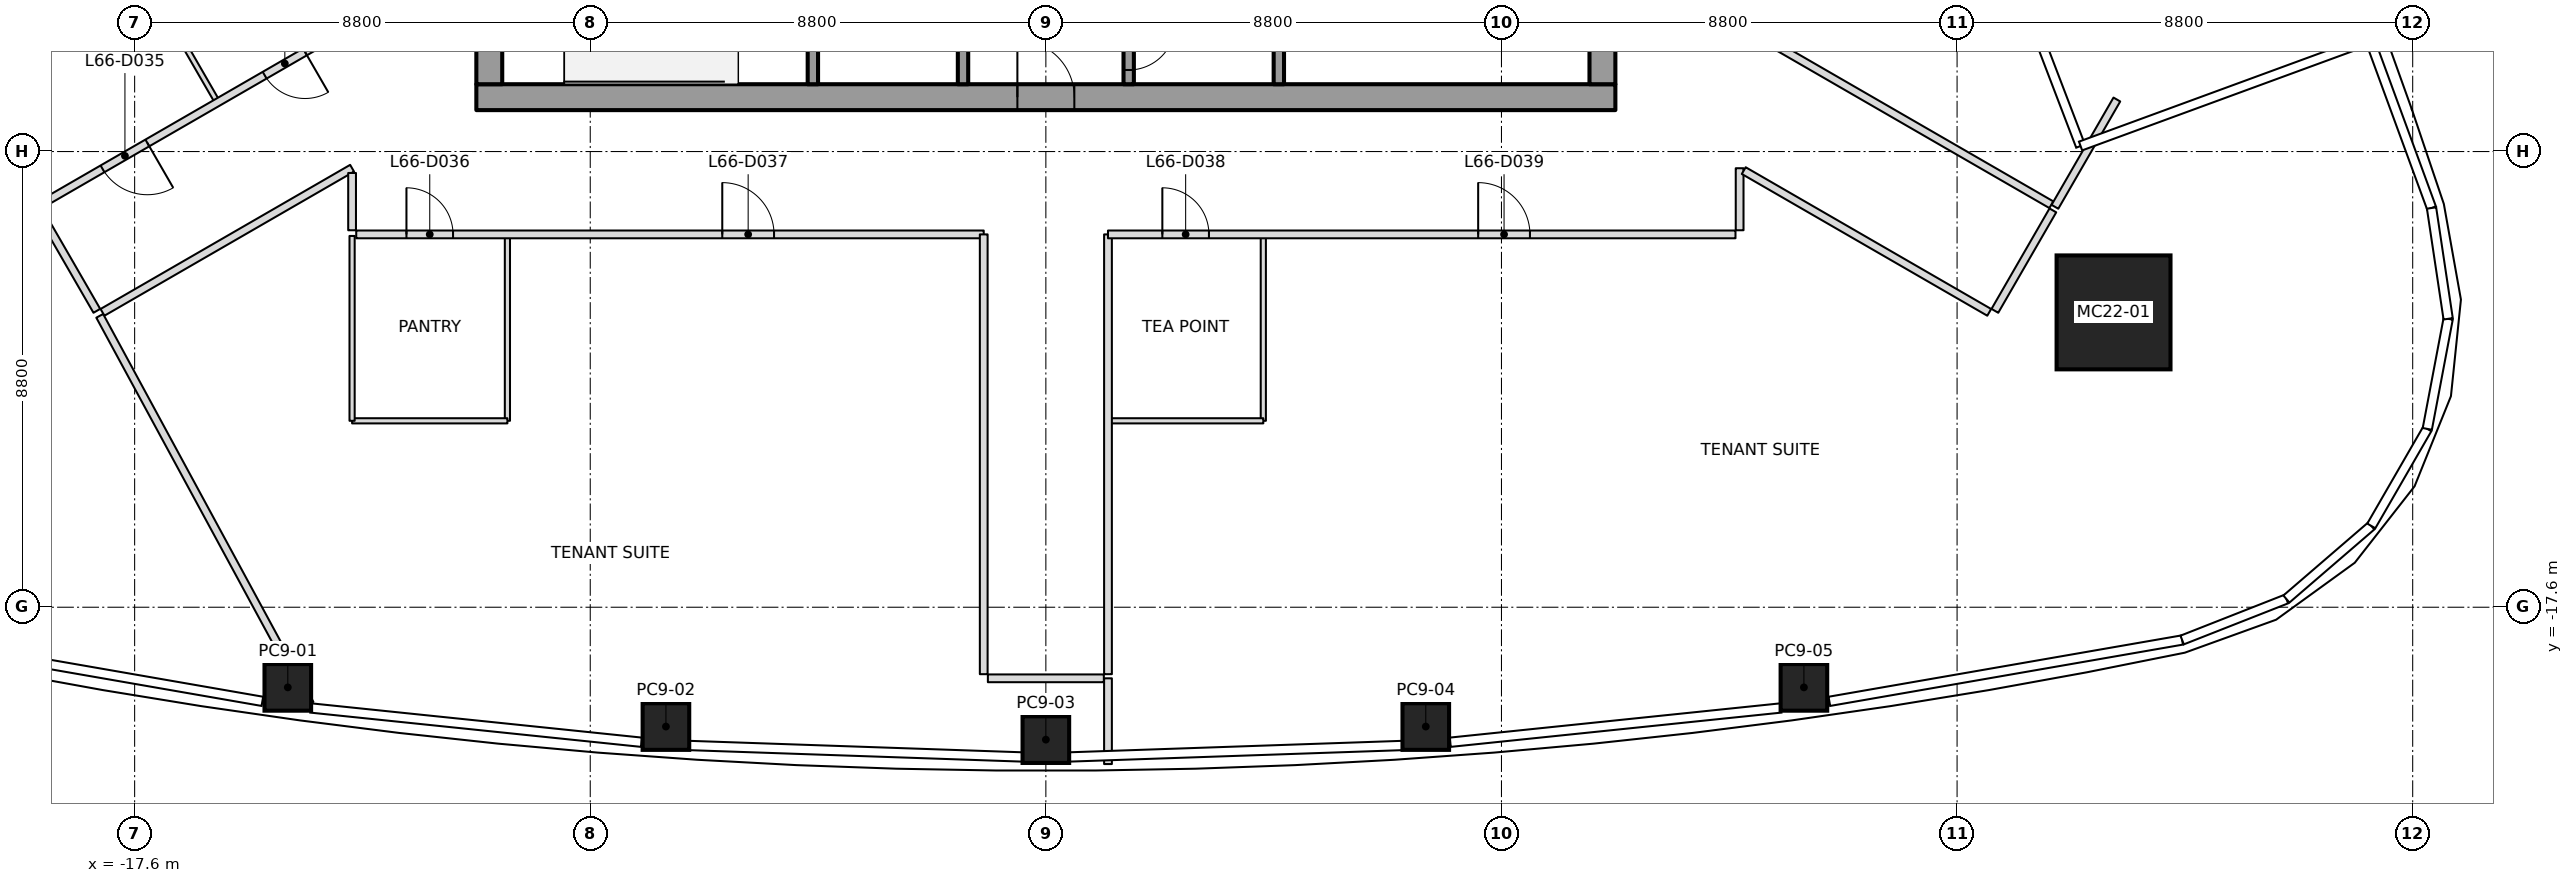
"""IFC4 building model, lengths in metres.
Left out: names, types, materials, properties, quantities, classifications, styles, units other than length and angle.
Written with IfcOpenShell. Run it as: python <this file> out.ifc"""

import sys

from ifc_helpers import new_model, si_unit, direction, frame, frame_2d, origin, origin_2d, place, context, subcontext, project, spatial, rectangle, extrude, element, fill, save


model = new_model("IFC4")
c1 = context("Model", 3, precision=1e-05, world=origin(), true_north=direction((0.0, 1.0)))
c2 = subcontext(c1, "Body", "Model", "MODEL_VIEW")
j1 = project(units=[si_unit("LENGTHUNIT", "METRE"), si_unit("PLANEANGLEUNIT", "RADIAN")], contexts=[c1])
p1 = place(None, origin())
s1 = spatial("IfcSite", under=j1, at=p1, CompositionType="ELEMENT")
p2 = place(p1, origin())
s2 = spatial("IfcBuilding", under=s1, at=p2, CompositionType="ELEMENT")
p3 = place(p2, frame((0.0, 0.0, 291.0)))
s3 = spatial("IfcBuildingStorey", under=s2, at=p3, CompositionType="ELEMENT", Elevation=291.0)
p4 = place(p3, frame((20.622, -11.906, 0.0), z_axis=(-0.027756720281, 0.01604399436, 0.999485945236), x_axis=(0.999614708015, 0.000445500311, 0.027753144871)))
e1 = element("IfcColumn", 1, at=p4, inside=s3, PredefinedType="COLUMN", context=c2, shape_type="SweptSolid", body=[
    extrude(rectangle(XDim=2.2, YDim=2.2, at=origin_2d()), origin(), (0.0, 0.0, 1.0), 4.002),
])
p5 = place(p3, frame((-14.642, -19.148, 0.0), z_axis=(0.017452456582, 0.010373837829, 0.999793876381), x_axis=(-0.99038951846, 0.137393509371, 0.015862701763)))
e2 = element("IfcColumn", 2, at=p5, inside=s3, PredefinedType="COLUMN", context=c2, shape_type="SweptSolid", body=[
    extrude(rectangle(XDim=0.9, YDim=0.9, at=origin_2d()), origin(), (0.0, 0.0, 1.0), 4.001),
])
p6 = place(p3, frame((-7.338, -19.905, 0.0), z_axis=(0.008727150594, 0.011168311599, 0.999899547784), x_axis=(-0.997594360715, 0.068865682036, 0.007937840196)))
e3 = element("IfcColumn", 3, at=p6, inside=s3, PredefinedType="COLUMN", context=c2, shape_type="SweptSolid", body=[
    extrude(rectangle(XDim=0.9, YDim=0.9, at=origin_2d()), origin(), (0.0, 0.0, 1.0), 4.0),
])
p7 = place(p3, frame((0.0, -20.157, 0.0), z_axis=(0.0, 0.01141283087, 0.999934871525), x_axis=(1.0, 0.0, 0.0)))
e4 = element("IfcColumn", 4, at=p7, inside=s3, PredefinedType="COLUMN", context=c2, shape_type="SweptSolid", body=[
    extrude(rectangle(XDim=0.9, YDim=0.9, at=origin_2d()), origin(), (0.0, 0.0, 1.0), 4.0),
])
p8 = place(p3, frame((7.338, -19.905, 0.0), z_axis=(-0.008727150594, 0.011168311599, 0.999899547784), x_axis=(0.997594360715, 0.068865682036, 0.007937840196)))
e5 = element("IfcColumn", 5, at=p8, inside=s3, PredefinedType="COLUMN", context=c2, shape_type="SweptSolid", body=[
    extrude(rectangle(XDim=0.9, YDim=0.9, at=origin_2d()), origin(), (0.0, 0.0, 1.0), 4.0),
])
p9 = place(p3, frame((14.642, -19.148, 0.0), z_axis=(-0.017452456582, 0.010373837829, 0.999793876381), x_axis=(0.99038951846, 0.137393509371, 0.015862701763)))
e6 = element("IfcColumn", 6, at=p9, inside=s3, PredefinedType="COLUMN", context=c2, shape_type="SweptSolid", body=[
    extrude(rectangle(XDim=0.9, YDim=0.9, at=origin_2d()), origin(), (0.0, 0.0, 1.0), 4.001),
])
p10 = place(p3, frame((-11.0, -7.75, 0.0), z_axis=(0.0, 0.0, 1.0), x_axis=(1.0, 0.0, 0.0)))
e7 = element("IfcWall", 7, at=p10, inside=s3, PredefinedType="SHEAR", context=c2, shape_type="SweptSolid", body=[
    extrude(rectangle(XDim=22.0, YDim=0.5, at=frame_2d((11.0, 0.0))), origin(), (0.0, 0.0, 1.0), 4.0),
])
p11 = place(p10, frame((10.45, 0.0, 0.0)))
e8 = element("IfcOpeningElement", 8, at=p11, cuts=e7, PredefinedType="OPENING", context=c2, shape_type="SweptSolid", body=[
    extrude(rectangle(XDim=1.1, YDim=2.1, at=frame_2d((0.55, 1.05))), frame((0.0, 0.25, 0.0), z_axis=(0.0, -1.0, 0.0), x_axis=(1.0, 0.0, 0.0)), (0.0, 0.0, 1.0), 0.5),
])
p12 = place(p3, frame((-10.75, -7.5, 0.0), z_axis=(0.0, 0.0, 1.0), x_axis=(0.0, 1.0, 0.0)))
e9 = element("IfcWall", 9, at=p12, inside=s3, PredefinedType="SHEAR", context=c2, shape_type="SweptSolid", body=[
    extrude(rectangle(XDim=15.0, YDim=0.5, at=frame_2d((7.5, 0.0))), origin(), (0.0, 0.0, 1.0), 4.0),
])
p13 = place(p12, frame((6.6, 0.0, 0.0)))
e10 = element("IfcOpeningElement", 10, at=p13, cuts=e9, PredefinedType="OPENING", context=c2, shape_type="SweptSolid", body=[
    extrude(rectangle(XDim=1.8, YDim=2.1, at=frame_2d((0.9, 1.05))), frame((0.0, 0.25, 0.0), z_axis=(0.0, -1.0, 0.0), x_axis=(1.0, 0.0, 0.0)), (0.0, 0.0, 1.0), 0.5),
])
p14 = place(p3, frame((10.75, -7.5, 0.0), z_axis=(0.0, 0.0, 1.0), x_axis=(0.0, 1.0, 0.0)))
e11 = element("IfcWall", 11, at=p14, inside=s3, PredefinedType="SHEAR", context=c2, shape_type="SweptSolid", body=[
    extrude(rectangle(XDim=15.0, YDim=0.5, at=frame_2d((7.5, 0.0))), origin(), (0.0, 0.0, 1.0), 4.0),
])
p15 = place(p14, frame((6.6, 0.0, 0.0)))
e12 = element("IfcOpeningElement", 12, at=p15, cuts=e11, PredefinedType="OPENING", context=c2, shape_type="SweptSolid", body=[
    extrude(rectangle(XDim=1.8, YDim=2.1, at=frame_2d((0.9, 1.05))), frame((0.0, 0.25, 0.0), z_axis=(0.0, -1.0, 0.0), x_axis=(1.0, 0.0, 0.0)), (0.0, 0.0, 1.0), 0.5),
])
p16 = place(p3, frame((-4.5, -4.6, 0.0), z_axis=(0.0, 0.0, 1.0), x_axis=(0.0, -1.0, 0.0)))
e13 = element("IfcWall", 13, at=p16, inside=s3, PredefinedType="SOLIDWALL", context=c2, shape_type="SweptSolid", body=[
    extrude(rectangle(XDim=2.9, YDim=0.2, at=frame_2d((1.45, 0.0))), origin(), (0.0, 0.0, 1.0), 3.85),
])
p17 = place(p3, frame((-1.6, -7.5, 0.0), z_axis=(0.0, 0.0, 1.0), x_axis=(0.0, 1.0, 0.0)))
e14 = element("IfcWall", 14, at=p17, inside=s3, PredefinedType="SOLIDWALL", context=c2, shape_type="SweptSolid", body=[
    extrude(rectangle(XDim=2.9, YDim=0.2, at=frame_2d((1.45, 0.0))), origin(), (0.0, 0.0, 1.0), 3.85),
])
p18 = place(p17, frame((0.9, 0.0, 0.0)))
e15 = element("IfcOpeningElement", 15, at=p18, cuts=e14, PredefinedType="OPENING", context=c2, shape_type="SweptSolid", body=[
    extrude(rectangle(XDim=1.1, YDim=2.1, at=frame_2d((0.55, 1.05))), frame((0.0, 0.1, 0.0), z_axis=(0.0, -1.0, 0.0), x_axis=(1.0, 0.0, 0.0)), (0.0, 0.0, 1.0), 0.2),
])
p19 = place(p3, frame((1.6, -6.05, 0.0), z_axis=(0.0, 0.0, 1.0), x_axis=(0.0, -1.0, 0.0)))
e16 = element("IfcWall", 16, at=p19, inside=s3, PredefinedType="SOLIDWALL", context=c2, shape_type="SweptSolid", body=[
    extrude(rectangle(XDim=1.45, YDim=0.2, at=frame_2d((0.725, 0.0))), origin(), (0.0, 0.0, 1.0), 3.85),
])
p20 = place(p19, frame((0.275, 0.0, 0.0)))
e17 = element("IfcOpeningElement", 17, at=p20, cuts=e16, PredefinedType="OPENING", context=c2, shape_type="SweptSolid", body=[
    extrude(rectangle(XDim=0.9, YDim=2.1, at=frame_2d((0.45, 1.05))), frame((0.0, 0.1, 0.0), z_axis=(0.0, -1.0, 0.0), x_axis=(1.0, 0.0, 0.0)), (0.0, 0.0, 1.0), 0.2),
])
p21 = place(p3, frame((4.5, -6.05, 0.0), z_axis=(0.0, 0.0, 1.0), x_axis=(0.0, -1.0, 0.0)))
e18 = element("IfcWall", 18, at=p21, inside=s3, PredefinedType="SOLIDWALL", context=c2, shape_type="SweptSolid", body=[
    extrude(rectangle(XDim=1.45, YDim=0.2, at=frame_2d((0.725, 0.0))), origin(), (0.0, 0.0, 1.0), 3.85),
])
p22 = place(p3, frame((-18.274, -11.973, 0.0), z_axis=(0.0, 0.0, 1.0), x_axis=(0.476644065294, -0.879096374137, 0.0)))
e19 = element("IfcWall", 19, at=p22, inside=s3, PredefinedType="PARTITIONING", context=c2, shape_type="SweptSolid", body=[
    extrude(rectangle(XDim=8.52, YDim=0.15, at=frame_2d((4.26, 0.0))), origin(), (0.0, 0.0, 1.0), 3.45),
])
p23 = place(p3, frame((1.2, -18.973, 0.0), z_axis=(0.0, 0.0, 1.0), x_axis=(0.0, -1.0, 0.0)))
e20 = element("IfcWall", 20, at=p23, inside=s3, PredefinedType="PARTITIONING", context=c2, shape_type="SweptSolid", body=[
    extrude(rectangle(XDim=1.656, YDim=0.15, at=frame_2d((0.828, 0.0))), origin(), (0.0, 0.0, 1.0), 3.234),
])
p24 = place(p3, frame((19.49, -9.867, 0.0), z_axis=(0.0, 0.0, 1.0), x_axis=(0.500046351717, 0.865998640954, 0.0)))
e21 = element("IfcWall", 21, at=p24, inside=s3, PredefinedType="PARTITIONING", context=c2, shape_type="SweptSolid", body=[
    extrude(rectangle(XDim=2.392, YDim=0.15, at=frame_2d((1.196, 0.0))), origin(), (0.0, 0.0, 1.0), 3.45),
])
p25 = place(p3, frame((-19.45, -9.936, 0.0), z_axis=(0.0, 0.0, 1.0), x_axis=(0.500030632641, -0.866007717299, 0.0)))
e22 = element("IfcWall", 22, at=p25, inside=s3, PredefinedType="PARTITIONING", context=c2, shape_type="SweptSolid", body=[
    extrude(rectangle(XDim=2.24, YDim=0.15, at=frame_2d((1.12, 0.0))), origin(), (0.0, 0.0, 1.0), 3.233),
])
p26 = place(p3, frame((-13.4, -6.351, 0.0), z_axis=(0.0, 0.0, 1.0), x_axis=(-0.8660347147, -0.499983872674, 0.0)))
e23 = element("IfcWall", 23, at=p26, inside=s3, PredefinedType="PARTITIONING", context=c2, shape_type="SweptSolid", body=[
    extrude(rectangle(XDim=6.952, YDim=0.15, at=frame_2d((3.476, 0.0))), origin(), (0.0, 0.0, 1.0), 3.317),
])
p27 = place(p26, frame((1.05, 0.0, 0.0)))
e24 = element("IfcOpeningElement", 24, at=p27, cuts=e23, PredefinedType="OPENING", context=c2, shape_type="SweptSolid", body=[
    extrude(rectangle(XDim=0.9, YDim=2.1, at=frame_2d((0.45, 1.05))), frame((0.0, 0.075, 0.0), z_axis=(0.0, -1.0, 0.0), x_axis=(1.0, 0.0, 0.0)), (0.0, 0.0, 1.0), 0.15),
])
p28 = place(p26, frame((4.566, 0.0, 0.0)))
e25 = element("IfcOpeningElement", 25, at=p28, cuts=e23, PredefinedType="OPENING", context=c2, shape_type="SweptSolid", body=[
    extrude(rectangle(XDim=1.0, YDim=2.1, at=frame_2d((0.5, 1.05))), frame((0.0, 0.075, 0.0), z_axis=(0.0, -1.0, 0.0), x_axis=(1.0, 0.0, 0.0)), (0.0, 0.0, 1.0), 0.15),
])
p29 = place(p3, frame((-18.221, -11.906, 0.0), z_axis=(0.0, 0.0, 1.0), x_axis=(0.866013219245, 0.500021103647, 0.0)))
e26 = element("IfcWall", 26, at=p29, inside=s3, PredefinedType="PARTITIONING", context=c2, shape_type="SweptSolid", body=[
    extrude(rectangle(XDim=5.567, YDim=0.15, at=frame_2d((2.783, 0.0))), origin(), (0.0, 0.0, 1.0), 3.233),
])
p30 = place(p3, frame((-13.4, -9.214, 0.0), z_axis=(0.0, 0.0, 1.0), x_axis=(0.0, -1.0, 0.0)))
e27 = element("IfcWall", 27, at=p30, inside=s3, PredefinedType="PARTITIONING", context=c2, shape_type="SweptSolid", body=[
    extrude(rectangle(XDim=1.106, YDim=0.15, at=frame_2d((0.553, 0.0))), origin(), (0.0, 0.0, 1.0), 3.233),
])
p31 = place(p3, frame((-13.32, -10.4, 0.0), z_axis=(0.0, 0.0, 1.0), x_axis=(1.0, 0.0, 0.0)))
e28 = element("IfcWall", 28, at=p31, inside=s3, PredefinedType="PARTITIONING", context=c2, shape_type="SweptSolid", body=[
    extrude(rectangle(XDim=12.12, YDim=0.15, at=frame_2d((6.06, 0.0))), origin(), (0.0, 0.0, 1.0), 3.393),
])
p32 = place(p31, frame((0.97, 0.0, 0.0)))
e29 = element("IfcOpeningElement", 29, at=p32, cuts=e28, PredefinedType="OPENING", context=c2, shape_type="SweptSolid", body=[
    extrude(rectangle(XDim=0.9, YDim=2.1, at=frame_2d((0.45, 1.05))), frame((0.0, 0.075, 0.0), z_axis=(0.0, -1.0, 0.0), x_axis=(1.0, 0.0, 0.0)), (0.0, 0.0, 1.0), 0.15),
])
p33 = place(p31, frame((7.07, 0.0, 0.0)))
e30 = element("IfcOpeningElement", 30, at=p33, cuts=e28, PredefinedType="OPENING", context=c2, shape_type="SweptSolid", body=[
    extrude(rectangle(XDim=1.0, YDim=2.1, at=frame_2d((0.5, 1.05))), frame((0.0, 0.075, 0.0), z_axis=(0.0, -1.0, 0.0), x_axis=(1.0, 0.0, 0.0)), (0.0, 0.0, 1.0), 0.15),
])
p34 = place(p3, frame((-1.2, -10.4, 0.0), z_axis=(0.0, 0.0, 1.0), x_axis=(0.0, -1.0, 0.0)))
e31 = element("IfcWall", 31, at=p34, inside=s3, PredefinedType="PARTITIONING", context=c2, shape_type="SweptSolid", body=[
    extrude(rectangle(XDim=8.493, YDim=0.15, at=frame_2d((4.247, 0.0))), origin(), (0.0, 0.0, 1.0), 3.45),
])
p35 = place(p3, frame((-1.12, -18.973, 0.0), z_axis=(0.0, 0.0, 1.0), x_axis=(1.0, 0.0, 0.0)))
e32 = element("IfcWall", 32, at=p35, inside=s3, PredefinedType="PARTITIONING", context=c2, shape_type="SweptSolid", body=[
    extrude(rectangle(XDim=2.24, YDim=0.15, at=frame_2d((1.12, 0.0))), origin(), (0.0, 0.0, 1.0), 3.45),
])
p36 = place(p3, frame((1.2, -18.893, 0.0), z_axis=(0.0, 0.0, 1.0), x_axis=(0.0, 1.0, 0.0)))
e33 = element("IfcWall", 33, at=p36, inside=s3, PredefinedType="PARTITIONING", context=c2, shape_type="SweptSolid", body=[
    extrude(rectangle(XDim=8.493, YDim=0.15, at=frame_2d((4.247, 0.0))), origin(), (0.0, 0.0, 1.0), 3.45),
])
p37 = place(p3, frame((1.2, -10.4, 0.0), z_axis=(0.0, 0.0, 1.0), x_axis=(1.0, 0.0, 0.0)))
e34 = element("IfcWall", 34, at=p37, inside=s3, PredefinedType="PARTITIONING", context=c2, shape_type="SweptSolid", body=[
    extrude(rectangle(XDim=12.12, YDim=0.15, at=frame_2d((6.06, 0.0))), origin(), (0.0, 0.0, 1.0), 3.393),
])
p38 = place(p37, frame((1.05, 0.0, 0.0)))
e35 = element("IfcOpeningElement", 35, at=p38, cuts=e34, PredefinedType="OPENING", context=c2, shape_type="SweptSolid", body=[
    extrude(rectangle(XDim=0.9, YDim=2.1, at=frame_2d((0.45, 1.05))), frame((0.0, 0.075, 0.0), z_axis=(0.0, -1.0, 0.0), x_axis=(1.0, 0.0, 0.0)), (0.0, 0.0, 1.0), 0.15),
])
p39 = place(p37, frame((7.15, 0.0, 0.0)))
e36 = element("IfcOpeningElement", 36, at=p39, cuts=e34, PredefinedType="OPENING", context=c2, shape_type="SweptSolid", body=[
    extrude(rectangle(XDim=1.0, YDim=2.1, at=frame_2d((0.5, 1.05))), frame((0.0, 0.075, 0.0), z_axis=(0.0, -1.0, 0.0), x_axis=(1.0, 0.0, 0.0)), (0.0, 0.0, 1.0), 0.15),
])
p40 = place(p3, frame((13.4, -10.32, 0.0), z_axis=(0.0, 0.0, 1.0), x_axis=(0.0, 1.0, 0.0)))
e37 = element("IfcWall", 37, at=p40, inside=s3, PredefinedType="PARTITIONING", context=c2, shape_type="SweptSolid", body=[
    extrude(rectangle(XDim=1.198, YDim=0.15, at=frame_2d((0.599, 0.0))), origin(), (0.0, 0.0, 1.0), 3.233),
])
p41 = place(p3, frame((13.479, -9.168, 0.0), z_axis=(0.0, 0.0, 1.0), x_axis=(0.866019989099, -0.500009378393, 0.0)))
e38 = element("IfcWall", 38, at=p41, inside=s3, PredefinedType="PARTITIONING", context=c2, shape_type="SweptSolid", body=[
    extrude(rectangle(XDim=5.475, YDim=0.15, at=frame_2d((2.738, 0.0))), origin(), (0.0, 0.0, 1.0), 3.233),
])
p42 = place(p3, frame((19.421, -9.827, 0.0), z_axis=(0.0, 0.0, 1.0), x_axis=(-0.8660347147, 0.499983872674, 0.0)))
e39 = element("IfcWall", 39, at=p42, inside=s3, PredefinedType="PARTITIONING", context=c2, shape_type="SweptSolid", body=[
    extrude(rectangle(XDim=6.952, YDim=0.15, at=frame_2d((3.476, 0.0))), origin(), (0.0, 0.0, 1.0), 3.317),
])
p43 = place(p3, frame((18.33, -11.876, 0.0), z_axis=(0.0, 0.0, 1.0), x_axis=(0.500030632641, 0.866007717299, 0.0)))
e40 = element("IfcWall", 40, at=p43, inside=s3, PredefinedType="PARTITIONING", context=c2, shape_type="SweptSolid", body=[
    extrude(rectangle(XDim=2.24, YDim=0.15, at=frame_2d((1.12, 0.0))), origin(), (0.0, 0.0, 1.0), 3.233),
])
for number, where, z_axis, x_axis in (
    (41, (-16.013, -7.825, 0.0), (0.0, 0.0, 1.0), (-0.5, 0.866, 0.0)),
    (42, (-10.4, -10.43, 0.0), (0.0, 0.0, 1.0), (0.0, -1.0, 0.0)),
):
    element("IfcWall", number, at=place(p3, frame(where, z_axis=z_axis, x_axis=x_axis)), inside=s3, PredefinedType="PARTITIONING", context=c2, shape_type="SweptSolid", body=[
        extrude(rectangle(XDim=3.57, YDim=0.1, at=frame_2d((1.785, 0.0))), origin(), (0.0, 0.0, 1.0), 3.45),
    ])
p44 = place(p3, frame((-10.4, -14.0, 0.0), z_axis=(0.0, 0.0, 1.0), x_axis=(-1.0, 0.0, 0.0)))
e43 = element("IfcWall", 43, at=p44, inside=s3, PredefinedType="PARTITIONING", context=c2, shape_type="SweptSolid", body=[
    extrude(rectangle(XDim=3.0, YDim=0.1, at=frame_2d((1.5, 0.0))), origin(), (0.0, 0.0, 1.0), 3.393),
])
for number, where, z_axis, x_axis in (
    (44, (-13.4, -14.0, 0.0), (0.0, 0.0, 1.0), (0.0, 1.0, 0.0)),
    (45, (4.2, -10.43, 0.0), (0.0, 0.0, 1.0), (0.0, -1.0, 0.0)),
):
    element("IfcWall", number, at=place(p3, frame(where, z_axis=z_axis, x_axis=x_axis)), inside=s3, PredefinedType="PARTITIONING", context=c2, shape_type="SweptSolid", body=[
        extrude(rectangle(XDim=3.57, YDim=0.1, at=frame_2d((1.785, 0.0))), origin(), (0.0, 0.0, 1.0), 3.45),
    ])
p45 = place(p3, frame((4.2, -14.0, 0.0), z_axis=(0.0, 0.0, 1.0), x_axis=(-1.0, 0.0, 0.0)))
e46 = element("IfcWall", 46, at=p45, inside=s3, PredefinedType="PARTITIONING", context=c2, shape_type="SweptSolid", body=[
    extrude(rectangle(XDim=2.97, YDim=0.1, at=frame_2d((1.485, 0.0))), origin(), (0.0, 0.0, 1.0), 3.393),
])
p46 = place(p27, origin())
e47 = element("IfcDoor", 47, at=p46, inside=s3, OperationType="SINGLE_SWING_RIGHT", PredefinedType="DOOR", context=c2, shape_type="SweptSolid", body=[
    extrude(rectangle(XDim=0.9, YDim=2.1, at=frame_2d((0.45, 1.05))), frame((0.0, 0.025, 0.0), z_axis=(0.0, -1.0, 0.0), x_axis=(1.0, 0.0, 0.0)), (0.0, 0.0, 1.0), 0.05),
])
fill(e24, e47)
p47 = place(p28, origin())
e48 = element("IfcDoor", 48, at=p47, inside=s3, OperationType="SINGLE_SWING_LEFT", PredefinedType="DOOR", context=c2, shape_type="SweptSolid", body=[
    extrude(rectangle(XDim=1.0, YDim=2.1, at=frame_2d((0.5, 1.05))), frame((0.0, 0.025, 0.0), z_axis=(0.0, -1.0, 0.0), x_axis=(1.0, 0.0, 0.0)), (0.0, 0.0, 1.0), 0.05),
])
fill(e25, e48)
p48 = place(p32, origin())
e49 = element("IfcDoor", 49, at=p48, inside=s3, OperationType="SINGLE_SWING_LEFT", PredefinedType="DOOR", context=c2, shape_type="SweptSolid", body=[
    extrude(rectangle(XDim=0.9, YDim=2.1, at=frame_2d((0.45, 1.05))), frame((0.0, 0.025, 0.0), z_axis=(0.0, -1.0, 0.0), x_axis=(1.0, 0.0, 0.0)), (0.0, 0.0, 1.0), 0.05),
])
fill(e29, e49)
p49 = place(p33, origin())
e50 = element("IfcDoor", 50, at=p49, inside=s3, OperationType="SINGLE_SWING_LEFT", PredefinedType="DOOR", context=c2, shape_type="SweptSolid", body=[
    extrude(rectangle(XDim=1.0, YDim=2.1, at=frame_2d((0.5, 1.05))), frame((0.0, 0.025, 0.0), z_axis=(0.0, -1.0, 0.0), x_axis=(1.0, 0.0, 0.0)), (0.0, 0.0, 1.0), 0.05),
])
fill(e30, e50)
p50 = place(p38, origin())
e51 = element("IfcDoor", 51, at=p50, inside=s3, OperationType="SINGLE_SWING_RIGHT", PredefinedType="DOOR", context=c2, shape_type="SweptSolid", body=[
    extrude(rectangle(XDim=0.9, YDim=2.1, at=frame_2d((0.45, 1.05))), frame((0.0, 0.025, 0.0), z_axis=(0.0, -1.0, 0.0), x_axis=(1.0, 0.0, 0.0)), (0.0, 0.0, 1.0), 0.05),
])
fill(e35, e51)
p51 = place(p39, origin())
e52 = element("IfcDoor", 52, at=p51, inside=s3, OperationType="SINGLE_SWING_LEFT", PredefinedType="DOOR", context=c2, shape_type="SweptSolid", body=[
    extrude(rectangle(XDim=1.0, YDim=2.1, at=frame_2d((0.5, 1.05))), frame((0.0, 0.025, 0.0), z_axis=(0.0, -1.0, 0.0), x_axis=(1.0, 0.0, 0.0)), (0.0, 0.0, 1.0), 0.05),
])
fill(e36, e52)
p52 = place(p20, origin())
e53 = element("IfcDoor", 53, at=p52, inside=s3, OperationType="SINGLE_SWING_LEFT", PredefinedType="DOOR", context=c2, shape_type="SweptSolid", body=[
    extrude(rectangle(XDim=0.9, YDim=2.1, at=frame_2d((0.45, 1.05))), frame((0.0, 0.025, 0.0), z_axis=(0.0, -1.0, 0.0), x_axis=(1.0, 0.0, 0.0)), (0.0, 0.0, 1.0), 0.05),
])
fill(e17, e53)
p53 = place(p11, origin())
e54 = element("IfcDoor", 54, at=p53, inside=s3, OperationType="SINGLE_SWING_RIGHT", PredefinedType="DOOR", context=c2, shape_type="SweptSolid", body=[
    extrude(rectangle(XDim=1.1, YDim=2.1, at=frame_2d((0.55, 1.05))), frame((0.0, 0.025, 0.0), z_axis=(0.0, -1.0, 0.0), x_axis=(1.0, 0.0, 0.0)), (0.0, 0.0, 1.0), 0.05),
])
fill(e8, e54)
save(model, sys.argv[1])
